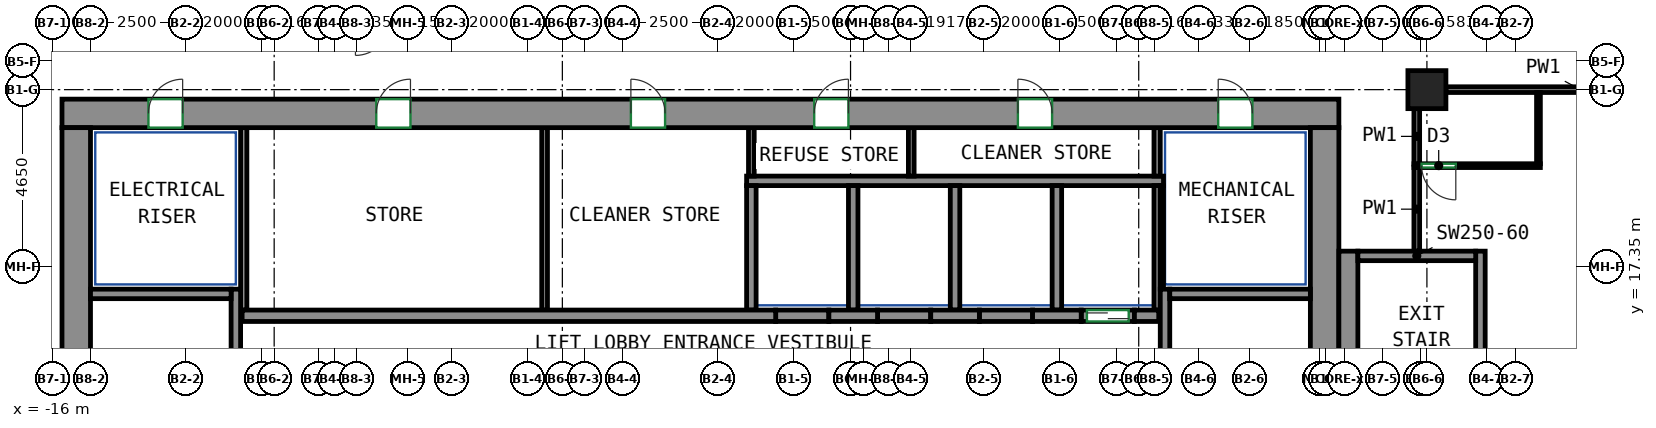
"""IFC4 building model, lengths in metres.
Left out: names, types, materials, properties, quantities, classifications, styles, units other than length and angle.
Written with IfcOpenShell. Run it as: python <this file> out.ifc"""

import sys

from ifc_helpers import new_model, si_unit, direction, frame, frame_2d, origin, origin_2d, place, context, subcontext, project, spatial, rectangle, extrude, source, transform, mapped, element, fill, save


model = new_model("IFC4")
c1 = context("Model", 3, precision=1e-05, world=origin(), true_north=direction((0.0, 1.0)))
c2 = subcontext(c1, "Body", "Model", "MODEL_VIEW")
j1 = project(units=[si_unit("LENGTHUNIT", "METRE"), si_unit("PLANEANGLEUNIT", "RADIAN")], contexts=[c1])
p1 = place(None, origin())
s1 = spatial("IfcSite", under=j1, at=p1, CompositionType="ELEMENT")
p2 = place(p1, origin())
s2 = spatial("IfcBuilding", under=s1, at=p2, CompositionType="ELEMENT")
p3 = place(p2, frame((0.0, 0.0, 220.3)))
s3 = spatial("IfcBuildingStorey", under=s2, at=p3, CompositionType="ELEMENT", Elevation=220.3)
m1 = source(origin(), c2, "Body", "SweptSolid", [
    extrude(rectangle(XDim=1.0, YDim=1.0, at=origin_2d()), origin(), (0.0, 0.0, 1.0), 3.0),
])
p4 = place(p3, frame((20.167, 22.0, 0.0), z_axis=(0.0, 0.0, 1.0), x_axis=(1.0, 0.0, 0.0)))
e1 = element("IfcColumn", 1, at=p4, inside=s3, PredefinedType="COLUMN", context=c2, shape_type="MappedRepresentation", body=[
    mapped(m1, transform((0.0, 0.0, 0.0))),
])
m2 = source(origin(), c2, "Body", "SweptSolid", [
    extrude(rectangle(XDim=33.6, YDim=0.75, at=frame_2d((16.8, 0.0))), origin(), (0.0, 0.0, 1.0), 3.0),
])
p5 = place(p3, frame((-15.75, 21.375, 0.0), z_axis=(0.0, 0.0, 1.0), x_axis=(1.0, 0.0, 0.0)))
e2 = element("IfcWall", 2, at=p5, inside=s3, PredefinedType="SHEAR", context=c2, shape_type="MappedRepresentation", body=[
    mapped(m2, transform((0.0, 0.0, 0.0))),
])
p6 = place(p5, frame((8.27, 0.0, 0.0)))
e3 = element("IfcOpeningElement", 3, at=p6, cuts=e2, PredefinedType="OPENING", context=c2, shape_type="SweptSolid", body=[
    extrude(rectangle(XDim=0.9, YDim=2.1, at=frame_2d((0.45, 1.05))), frame((0.0, 0.385, 0.0), z_axis=(0.0, -1.0, 0.0), x_axis=(1.0, 0.0, 0.0)), (0.0, 0.0, 1.0), 0.77),
])
p7 = place(p5, frame((14.97, 0.0, 0.0)))
e4 = element("IfcOpeningElement", 4, at=p7, cuts=e2, PredefinedType="OPENING", context=c2, shape_type="SweptSolid", body=[
    extrude(rectangle(XDim=0.9, YDim=2.1, at=frame_2d((0.45, 1.05))), frame((0.0, 0.385, 0.0), z_axis=(0.0, -1.0, 0.0), x_axis=(1.0, 0.0, 0.0)), (0.0, 0.0, 1.0), 0.77),
])
p8 = place(p5, frame((19.794, 0.0, 0.0)))
e5 = element("IfcOpeningElement", 5, at=p8, cuts=e2, PredefinedType="OPENING", context=c2, shape_type="SweptSolid", body=[
    extrude(rectangle(XDim=0.9, YDim=2.1, at=frame_2d((0.45, 1.05))), frame((0.0, 0.385, 0.0), z_axis=(0.0, -1.0, 0.0), x_axis=(1.0, 0.0, 0.0)), (0.0, 0.0, 1.0), 0.77),
])
p9 = place(p5, frame((25.154, 0.0, 0.0)))
e6 = element("IfcOpeningElement", 6, at=p9, cuts=e2, PredefinedType="OPENING", context=c2, shape_type="SweptSolid", body=[
    extrude(rectangle(XDim=0.9, YDim=2.1, at=frame_2d((0.45, 1.05))), frame((0.0, 0.385, 0.0), z_axis=(0.0, -1.0, 0.0), x_axis=(1.0, 0.0, 0.0)), (0.0, 0.0, 1.0), 0.77),
])
p10 = place(p5, frame((2.275, 0.0, 0.0)))
e7 = element("IfcOpeningElement", 7, at=p10, cuts=e2, PredefinedType="OPENING", context=c2, shape_type="SweptSolid", body=[
    extrude(rectangle(XDim=0.9, YDim=2.1, at=frame_2d((0.45, 1.05))), frame((0.0, 0.385, 0.0), z_axis=(0.0, -1.0, 0.0), x_axis=(1.0, 0.0, 0.0)), (0.0, 0.0, 1.0), 0.77),
])
p11 = place(p5, frame((30.425, 0.0, 0.0)))
e8 = element("IfcOpeningElement", 8, at=p11, cuts=e2, PredefinedType="OPENING", context=c2, shape_type="SweptSolid", body=[
    extrude(rectangle(XDim=0.9, YDim=2.1, at=frame_2d((0.45, 1.05))), frame((0.0, 0.385, 0.0), z_axis=(0.0, -1.0, 0.0), x_axis=(1.0, 0.0, 0.0)), (0.0, 0.0, 1.0), 0.77),
])
m3 = source(origin(), c2, "Body", "SweptSolid", [
    extrude(rectangle(XDim=12.0, YDim=0.75, at=frame_2d((6.0, 0.0))), origin(), (0.0, 0.0, 1.0), 3.0),
])
for number, where, z_axis, x_axis in (
    (9, (-15.375, 9.0, 0.0), (0.0, 0.0, 1.0), (0.0, 1.0, 0.0)),
    (10, (17.475, 9.0, 0.0), (0.0, 0.0, 1.0), (0.0, 1.0, 0.0)),
):
    element("IfcWall", number, at=place(p3, frame(where, z_axis=z_axis, x_axis=x_axis)), inside=s3, PredefinedType="SHEAR", context=c2, shape_type="MappedRepresentation", body=[
        mapped(m3, transform((0.0, 0.0, 0.0))),
    ])
m4 = source(origin(), c2, "Body", "SweptSolid", [
    extrude(rectangle(XDim=7.75, YDim=0.25, at=frame_2d((3.875, 0.0))), origin(), (0.0, 0.0, 1.0), 3.0),
])
p12 = place(p3, frame((-11.175, 9.0, 0.0), z_axis=(0.0, 0.0, 1.0), x_axis=(0.0, 1.0, 0.0)))
e11 = element("IfcWall", 11, at=p12, inside=s3, PredefinedType="SHEAR", context=c2, shape_type="MappedRepresentation", body=[
    mapped(m4, transform((0.0, 0.0, 0.0))),
])
m5 = source(origin(), c2, "Body", "SweptSolid", [
    extrude(rectangle(XDim=3.7, YDim=0.25, at=frame_2d((1.85, 0.0))), origin(), (0.0, 0.0, 1.0), 3.0),
])
p13 = place(p3, frame((-15.0, 16.625, 0.0), z_axis=(0.0, 0.0, 1.0), x_axis=(1.0, 0.0, 0.0)))
e12 = element("IfcWall", 12, at=p13, inside=s3, PredefinedType="SHEAR", context=c2, shape_type="MappedRepresentation", body=[
    mapped(m5, transform((0.0, 0.0, 0.0))),
])
p14 = place(p3, frame((13.275, 9.0, 0.0), z_axis=(0.0, 0.0, 1.0), x_axis=(0.0, 1.0, 0.0)))
e13 = element("IfcWall", 13, at=p14, inside=s3, PredefinedType="SHEAR", context=c2, shape_type="MappedRepresentation", body=[
    mapped(m4, transform((0.0, 0.0, 0.0))),
])
m6 = source(origin(), c2, "Body", "SweptSolid", [
    extrude(rectangle(XDim=3.7, YDim=0.25, at=frame_2d((1.85, 0.0))), origin(), (0.0, 0.0, 1.0), 3.0),
])
p15 = place(p3, frame((13.4, 16.625, 0.0), z_axis=(0.0, 0.0, 1.0), x_axis=(1.0, 0.0, 0.0)))
e14 = element("IfcWall", 14, at=p15, inside=s3, PredefinedType="SHEAR", context=c2, shape_type="MappedRepresentation", body=[
    mapped(m6, transform((0.0, 0.0, 0.0))),
])
m7 = source(origin(), c2, "Body", "SweptSolid", [
    extrude(rectangle(XDim=8.0, YDim=0.5, at=frame_2d((4.0, 0.0))), origin(), (0.0, 0.0, 1.0), 3.0),
])
p16 = place(p3, frame((18.1, 9.75, 0.0), z_axis=(0.0, 0.0, 1.0), x_axis=(0.0, 1.0, 0.0)))
e15 = element("IfcWall", 15, at=p16, inside=s3, PredefinedType="SHEAR", context=c2, shape_type="MappedRepresentation", body=[
    mapped(m7, transform((0.0, 0.0, 0.0))),
])
m8 = source(origin(), c2, "Body", "SweptSolid", [
    extrude(rectangle(XDim=8.0, YDim=0.25, at=frame_2d((4.0, 0.0))), origin(), (0.0, 0.0, 1.0), 3.0),
])
p17 = place(p3, frame((21.575, 9.75, 0.0), z_axis=(0.0, 0.0, 1.0), x_axis=(0.0, 1.0, 0.0)))
e16 = element("IfcWall", 16, at=p17, inside=s3, PredefinedType="SHEAR", context=c2, shape_type="MappedRepresentation", body=[
    mapped(m8, transform((0.0, 0.0, 0.0))),
])
m9 = source(origin(), c2, "Body", "SweptSolid", [
    extrude(rectangle(XDim=3.1, YDim=0.25, at=frame_2d((1.55, 0.0))), origin(), (0.0, 0.0, 1.0), 3.0),
])
p18 = place(p3, frame((18.35, 17.625, 0.0), z_axis=(0.0, 0.0, 1.0), x_axis=(1.0, 0.0, 0.0)))
e17 = element("IfcWall", 17, at=p18, inside=s3, PredefinedType="SHEAR", context=c2, shape_type="MappedRepresentation", body=[
    mapped(m9, transform((0.0, 0.0, 0.0))),
])
m10 = source(origin(), c2, "Body", "SweptSolid", [
    extrude(rectangle(XDim=14.04, YDim=0.3, at=frame_2d((7.02, 0.0))), origin(), (0.0, 0.0, 1.0), 3.0),
])
p19 = place(p3, frame((-11.01, 16.05, 0.0), z_axis=(0.0, 0.0, 1.0), x_axis=(1.0, 0.0, 0.0)))
e18 = element("IfcWall", 18, at=p19, inside=s3, PredefinedType="SHEAR", context=c2, shape_type="MappedRepresentation", body=[
    mapped(m10, transform((0.0, 0.0, 0.0))),
])
m11 = source(origin(), c2, "Body", "SweptSolid", [
    extrude(rectangle(XDim=1.28, YDim=0.3, at=frame_2d((0.64, 0.0))), origin(), (0.0, 0.0, 1.0), 3.0),
])
p20 = place(p3, frame((4.43, 16.05, 0.0), z_axis=(0.0, 0.0, 1.0), x_axis=(1.0, 0.0, 0.0)))
e19 = element("IfcWall", 19, at=p20, inside=s3, PredefinedType="SHEAR", context=c2, shape_type="MappedRepresentation", body=[
    mapped(m11, transform((0.0, 0.0, 0.0))),
])
m12 = source(origin(), c2, "Body", "SweptSolid", [
    extrude(rectangle(XDim=1.28, YDim=0.3, at=frame_2d((0.64, 0.0))), origin(), (0.0, 0.0, 1.0), 3.0),
])
p21 = place(p3, frame((7.11, 16.05, 0.0), z_axis=(0.0, 0.0, 1.0), x_axis=(1.0, 0.0, 0.0)))
e20 = element("IfcWall", 20, at=p21, inside=s3, PredefinedType="SHEAR", context=c2, shape_type="MappedRepresentation", body=[
    mapped(m12, transform((0.0, 0.0, 0.0))),
])
p22 = place(p3, frame((9.79, 16.05, 0.0), z_axis=(0.0, 0.0, 1.0), x_axis=(1.0, 0.0, 0.0)))
e21 = element("IfcWall", 21, at=p22, inside=s3, PredefinedType="SHEAR", context=c2, shape_type="MappedRepresentation", body=[
    mapped(m11, transform((0.0, 0.0, 0.0))),
])
m13 = source(origin(), c2, "Body", "SweptSolid", [
    extrude(rectangle(XDim=0.64, YDim=0.3, at=frame_2d((0.32, 0.0))), origin(), (0.0, 0.0, 1.0), 3.0),
])
p23 = place(p3, frame((12.47, 16.05, 0.0), z_axis=(0.0, 0.0, 1.0), x_axis=(1.0, 0.0, 0.0)))
e22 = element("IfcWall", 22, at=p23, inside=s3, PredefinedType="SHEAR", context=c2, shape_type="MappedRepresentation", body=[
    mapped(m13, transform((0.0, 0.0, 0.0))),
])
m14 = source(origin(), c2, "Body", "SweptSolid", [
    extrude(rectangle(XDim=1.4, YDim=0.3, at=frame_2d((0.7, 0.0))), origin(), (0.0, 0.0, 1.0), 3.0),
])
p24 = place(p3, frame((11.07, 16.05, 0.0), z_axis=(0.0, 0.0, 1.0), x_axis=(1.0, 0.0, 0.0)))
e23 = element("IfcWall", 23, at=p24, inside=s3, PredefinedType="PARTITIONING", context=c2, shape_type="MappedRepresentation", body=[
    mapped(m14, transform((0.0, 0.0, 0.0))),
])
p25 = place(p24, frame((0.15, 0.0, 0.0)))
e24 = element("IfcOpeningElement", 24, at=p25, cuts=e23, PredefinedType="OPENING", context=c2, shape_type="SweptSolid", body=[
    extrude(rectangle(XDim=1.1, YDim=2.1, at=frame_2d((0.55, 1.05))), frame((0.0, 0.16, 0.0), z_axis=(0.0, -1.0, 0.0), x_axis=(1.0, 0.0, 0.0)), (0.0, 0.0, 1.0), 0.32),
])
p26 = place(p3, frame((3.03, 16.05, 0.0), z_axis=(0.0, 0.0, 1.0), x_axis=(1.0, 0.0, 0.0)))
e25 = element("IfcWall", 25, at=p26, inside=s3, PredefinedType="PARTITIONING", context=c2, shape_type="MappedRepresentation", body=[
    mapped(m14, transform((0.0, 0.0, 0.0))),
])
m15 = source(origin(), c2, "Body", "SweptSolid", [
    extrude(rectangle(XDim=1.4, YDim=0.3, at=frame_2d((0.7, 0.0))), origin(), (0.0, 0.0, 1.0), 3.0),
])
for number, where, z_axis, x_axis in (
    (26, (5.71, 16.05, 0.0), (0.0, 0.0, 1.0), (1.0, 0.0, 0.0)),
    (27, (8.39, 16.05, 0.0), (0.0, 0.0, 1.0), (1.0, 0.0, 0.0)),
):
    element("IfcWall", number, at=place(p3, frame(where, z_axis=z_axis, x_axis=x_axis)), inside=s3, PredefinedType="PARTITIONING", context=c2, shape_type="MappedRepresentation", body=[
        mapped(m15, transform((0.0, 0.0, 0.0))),
    ])
m16 = source(origin(), c2, "Body", "SweptSolid", [
    extrude(rectangle(XDim=10.97, YDim=0.25, at=frame_2d((5.485, 0.0))), origin(), (0.0, 0.0, 1.0), 3.0),
])
p27 = place(p3, frame((2.265, 19.6, 0.0), z_axis=(0.0, 0.0, 1.0), x_axis=(1.0, 0.0, 0.0)))
e28 = element("IfcWall", 28, at=p27, inside=s3, PredefinedType="PARTITIONING", context=c2, shape_type="MappedRepresentation", body=[
    mapped(m16, transform((0.0, 0.0, 0.0))),
])
m17 = source(origin(), c2, "Body", "SweptSolid", [
    extrude(rectangle(XDim=3.275, YDim=0.165, at=frame_2d((1.638, 0.0))), origin(), (0.0, 0.0, 1.0), 3.0),
])
p28 = place(p3, frame((13.067, 16.2, 0.0), z_axis=(0.0, 0.0, 1.0), x_axis=(0.0, 1.0, 0.0)))
e29 = element("IfcWall", 29, at=p28, inside=s3, PredefinedType="PARTITIONING", context=c2, shape_type="MappedRepresentation", body=[
    mapped(m17, transform((0.0, 0.0, 0.0))),
])
m18 = source(origin(), c2, "Body", "SweptSolid", [
    extrude(rectangle(XDim=1.275, YDim=0.165, at=frame_2d((0.637, 0.0))), origin(), (0.0, 0.0, 1.0), 3.0),
])
p29 = place(p3, frame((13.067, 19.725, 0.0), z_axis=(0.0, 0.0, 1.0), x_axis=(0.0, 1.0, 0.0)))
e30 = element("IfcWall", 30, at=p29, inside=s3, PredefinedType="PARTITIONING", context=c2, shape_type="MappedRepresentation", body=[
    mapped(m18, transform((0.0, 0.0, 0.0))),
])
m19 = source(origin(), c2, "Body", "SweptSolid", [
    extrude(rectangle(XDim=4.8, YDim=0.165, at=frame_2d((2.4, 0.0))), origin(), (0.0, 0.0, 1.0), 3.0),
])
p30 = place(p3, frame((-10.968, 16.2, 0.0), z_axis=(0.0, 0.0, 1.0), x_axis=(0.0, 1.0, 0.0)))
e31 = element("IfcWall", 31, at=p30, inside=s3, PredefinedType="PARTITIONING", context=c2, shape_type="MappedRepresentation", body=[
    mapped(m19, transform((0.0, 0.0, 0.0))),
])
m20 = source(origin(), c2, "Body", "SweptSolid", [
    extrude(rectangle(XDim=3.275, YDim=0.25, at=frame_2d((1.638, 0.0))), origin(), (0.0, 0.0, 1.0), 3.0),
])
p31 = place(p3, frame((10.43, 16.2, 0.0), z_axis=(0.0, 0.0, 1.0), x_axis=(0.0, 1.0, 0.0)))
e32 = element("IfcWall", 32, at=p31, inside=s3, PredefinedType="PARTITIONING", context=c2, shape_type="MappedRepresentation", body=[
    mapped(m20, transform((0.0, 0.0, 0.0))),
])
m21 = source(origin(), c2, "Body", "SweptSolid", [
    extrude(rectangle(XDim=2.725, YDim=0.085, at=frame_2d((1.363, 0.0))), origin(), (0.0, 0.0, 1.0), 3.0),
])
p32 = place(p3, frame((13.192, 16.75, 0.0), z_axis=(0.0, 0.0, 1.0), x_axis=(0.0, 1.0, 0.0)))
e33 = element("IfcWall", 33, at=p32, inside=s3, PredefinedType="PARTITIONING", context=c2, shape_type="MappedRepresentation", body=[
    mapped(m21, transform((0.0, 0.0, 0.0))),
])
for number, where, z_axis, x_axis in (
    (34, (2.39, 16.2, 0.0), (0.0, 0.0, 1.0), (0.0, 1.0, 0.0)),
    (35, (5.07, 16.2, 0.0), (0.0, 0.0, 1.0), (0.0, 1.0, 0.0)),
    (36, (7.75, 16.2, 0.0), (0.0, 0.0, 1.0), (0.0, 1.0, 0.0)),
):
    element("IfcWall", number, at=place(p3, frame(where, z_axis=z_axis, x_axis=x_axis)), inside=s3, PredefinedType="PARTITIONING", context=c2, shape_type="MappedRepresentation", body=[
        mapped(m20, transform((0.0, 0.0, 0.0))),
    ])
m22 = source(origin(), c2, "Body", "SweptSolid", [
    extrude(rectangle(XDim=4.8, YDim=0.15, at=frame_2d((2.4, 0.0))), origin(), (0.0, 0.0, 1.0), 3.0),
])
p33 = place(p3, frame((-3.05, 16.2, 0.0), z_axis=(0.0, 0.0, 1.0), x_axis=(0.0, 1.0, 0.0)))
e37 = element("IfcWall", 37, at=p33, inside=s3, PredefinedType="PARTITIONING", context=c2, shape_type="MappedRepresentation", body=[
    mapped(m22, transform((0.0, 0.0, 0.0))),
])
m23 = source(origin(), c2, "Body", "SweptSolid", [
    extrude(rectangle(XDim=1.275, YDim=0.15, at=frame_2d((0.637, 0.0))), origin(), (0.0, 0.0, 1.0), 3.0),
])
for number, where, z_axis, x_axis in (
    (38, (2.39, 19.725, 0.0), (0.0, 0.0, 1.0), (0.0, 1.0, 0.0)),
    (39, (6.598, 19.725, 0.0), (0.0, 0.0, 1.0), (0.0, 1.0, 0.0)),
):
    element("IfcWall", number, at=place(p3, frame(where, z_axis=z_axis, x_axis=x_axis)), inside=s3, PredefinedType="PARTITIONING", context=c2, shape_type="MappedRepresentation", body=[
        mapped(m23, transform((0.0, 0.0, 0.0))),
    ])
p34 = place(p3, frame((19.9, 17.75, 0.0), z_axis=(0.0, 0.0, 1.0), x_axis=(0.0, 1.0, 0.0)))
e40 = element("IfcWall", 40, at=p34, inside=s3, PredefinedType="PARTITIONING", context=c2, shape_type="SweptSolid", body=[
    extrude(rectangle(XDim=2.21, YDim=0.15, at=frame_2d((1.105, 0.0))), origin(), (0.0, 0.0, 1.0), 3.0),
])
p35 = place(p3, frame((20.667, 22.0, 0.0), z_axis=(0.0, 0.0, 1.0), x_axis=(1.0, 0.0, 0.0)))
e41 = element("IfcWall", 41, at=p35, inside=s3, PredefinedType="PARTITIONING", context=c2, shape_type="SweptSolid", body=[
    extrude(rectangle(XDim=7.083, YDim=0.15, at=frame_2d((3.542, 0.0))), origin(), (0.0, 0.0, 1.0), 3.0),
])
p36 = place(p35, frame((4.254, 0.0, 0.0)))
e42 = element("IfcOpeningElement", 42, at=p36, cuts=e41, PredefinedType="OPENING", context=c2, shape_type="SweptSolid", body=[
    extrude(rectangle(XDim=1.0, YDim=2.1, at=frame_2d((0.5, 1.05))), frame((0.0, 0.085, 0.0), z_axis=(0.0, -1.0, 0.0), x_axis=(1.0, 0.0, 0.0)), (0.0, 0.0, 1.0), 0.17),
])
p37 = place(p3, frame((19.9, 20.04, 0.0), z_axis=(0.0, 0.0, 1.0), x_axis=(0.0, 1.0, 0.0)))
e43 = element("IfcWall", 43, at=p37, inside=s3, PredefinedType="PARTITIONING", context=c2, shape_type="SweptSolid", body=[
    extrude(rectangle(XDim=1.46, YDim=0.15, at=frame_2d((0.73, 0.0))), origin(), (0.0, 0.0, 1.0), 3.0),
])
p38 = place(p3, frame((23.102, 20.05, 0.0), z_axis=(0.0, 0.0, 1.0), x_axis=(0.0, 1.0, 0.0)))
e44 = element("IfcWall", 44, at=p38, inside=s3, PredefinedType="PARTITIONING", context=c2, shape_type="SweptSolid", body=[
    extrude(rectangle(XDim=1.873, YDim=0.1, at=frame_2d((0.937, 0.0))), origin(), (0.0, 0.0, 1.0), 3.0),
])
p39 = place(p3, frame((23.152, 20.0, 0.0), z_axis=(0.0, 0.0, 1.0), x_axis=(-1.0, 0.0, 0.0)))
e45 = element("IfcWall", 45, at=p39, inside=s3, PredefinedType="PARTITIONING", context=c2, shape_type="SweptSolid", body=[
    extrude(rectangle(XDim=3.325, YDim=0.1, at=frame_2d((1.663, 0.0))), origin(), (0.0, 0.0, 1.0), 3.0),
])
p40 = place(p39, frame((2.225, 0.0, 0.0)))
e46 = element("IfcOpeningElement", 46, at=p40, cuts=e45, PredefinedType="OPENING", context=c2, shape_type="SweptSolid", body=[
    extrude(rectangle(XDim=0.9, YDim=2.1, at=frame_2d((0.45, 1.05))), frame((0.0, 0.06, 0.0), z_axis=(0.0, -1.0, 0.0), x_axis=(1.0, 0.0, 0.0)), (0.0, 0.0, 1.0), 0.12),
])
p41 = place(p25, origin())
e47 = element("IfcDoor", 47, at=p41, inside=s3, OperationType="DOUBLE_DOOR_SLIDING", PredefinedType="DOOR", context=c2, shape_type="SweptSolid", body=[
    extrude(rectangle(XDim=1.1, YDim=2.1, at=frame_2d((0.55, 1.05))), frame((0.0, 0.025, 0.0), z_axis=(0.0, -1.0, 0.0), x_axis=(1.0, 0.0, 0.0)), (0.0, 0.0, 1.0), 0.05),
])
fill(e24, e47)
p42 = place(p6, origin())
e48 = element("IfcDoor", 48, at=p42, inside=s3, OperationType="SINGLE_SWING_RIGHT", PredefinedType="DOOR", context=c2, shape_type="SweptSolid", body=[
    extrude(rectangle(XDim=0.9, YDim=2.1, at=frame_2d((0.45, 1.05))), frame((0.0, -0.23, 0.0), z_axis=(0.0, -1.0, 0.0), x_axis=(1.0, 0.0, 0.0)), (0.0, 0.0, 1.0), 0.05),
])
fill(e3, e48)
p43 = place(p7, origin())
e49 = element("IfcDoor", 49, at=p43, inside=s3, OperationType="SINGLE_SWING_LEFT", PredefinedType="DOOR", context=c2, shape_type="SweptSolid", body=[
    extrude(rectangle(XDim=0.9, YDim=2.1, at=frame_2d((0.45, 1.05))), frame((0.0, -0.23, 0.0), z_axis=(0.0, -1.0, 0.0), x_axis=(1.0, 0.0, 0.0)), (0.0, 0.0, 1.0), 0.05),
])
fill(e4, e49)
p44 = place(p8, origin())
e50 = element("IfcDoor", 50, at=p44, inside=s3, OperationType="SINGLE_SWING_RIGHT", PredefinedType="DOOR", context=c2, shape_type="SweptSolid", body=[
    extrude(rectangle(XDim=0.9, YDim=2.1, at=frame_2d((0.45, 1.05))), frame((0.0, -0.23, 0.0), z_axis=(0.0, -1.0, 0.0), x_axis=(1.0, 0.0, 0.0)), (0.0, 0.0, 1.0), 0.05),
])
fill(e5, e50)
p45 = place(p9, origin())
e51 = element("IfcDoor", 51, at=p45, inside=s3, OperationType="SINGLE_SWING_LEFT", PredefinedType="DOOR", context=c2, shape_type="SweptSolid", body=[
    extrude(rectangle(XDim=0.9, YDim=2.1, at=frame_2d((0.45, 1.05))), frame((0.0, -0.23, 0.0), z_axis=(0.0, -1.0, 0.0), x_axis=(1.0, 0.0, 0.0)), (0.0, 0.0, 1.0), 0.05),
])
fill(e6, e51)
p46 = place(p10, origin())
e52 = element("IfcDoor", 52, at=p46, inside=s3, OperationType="SINGLE_SWING_RIGHT", PredefinedType="DOOR", context=c2, shape_type="SweptSolid", body=[
    extrude(rectangle(XDim=0.9, YDim=2.1, at=frame_2d((0.45, 1.05))), frame((0.0, -0.23, 0.0), z_axis=(0.0, -1.0, 0.0), x_axis=(1.0, 0.0, 0.0)), (0.0, 0.0, 1.0), 0.05),
])
fill(e7, e52)
p47 = place(p11, origin())
e53 = element("IfcDoor", 53, at=p47, inside=s3, OperationType="SINGLE_SWING_LEFT", PredefinedType="DOOR", context=c2, shape_type="SweptSolid", body=[
    extrude(rectangle(XDim=0.9, YDim=2.1, at=frame_2d((0.45, 1.05))), frame((0.0, -0.23, 0.0), z_axis=(0.0, -1.0, 0.0), x_axis=(1.0, 0.0, 0.0)), (0.0, 0.0, 1.0), 0.05),
])
fill(e8, e53)
p48 = place(p40, origin())
e54 = element("IfcDoor", 54, at=p48, inside=s3, OperationType="SINGLE_SWING_LEFT", PredefinedType="DOOR", context=c2, shape_type="SweptSolid", body=[
    extrude(rectangle(XDim=0.9, YDim=2.1, at=frame_2d((0.45, 1.05))), frame((0.0, 0.025, 0.0), z_axis=(0.0, -1.0, 0.0), x_axis=(1.0, 0.0, 0.0)), (0.0, 0.0, 1.0), 0.05),
])
fill(e46, e54)
save(model, sys.argv[1])
